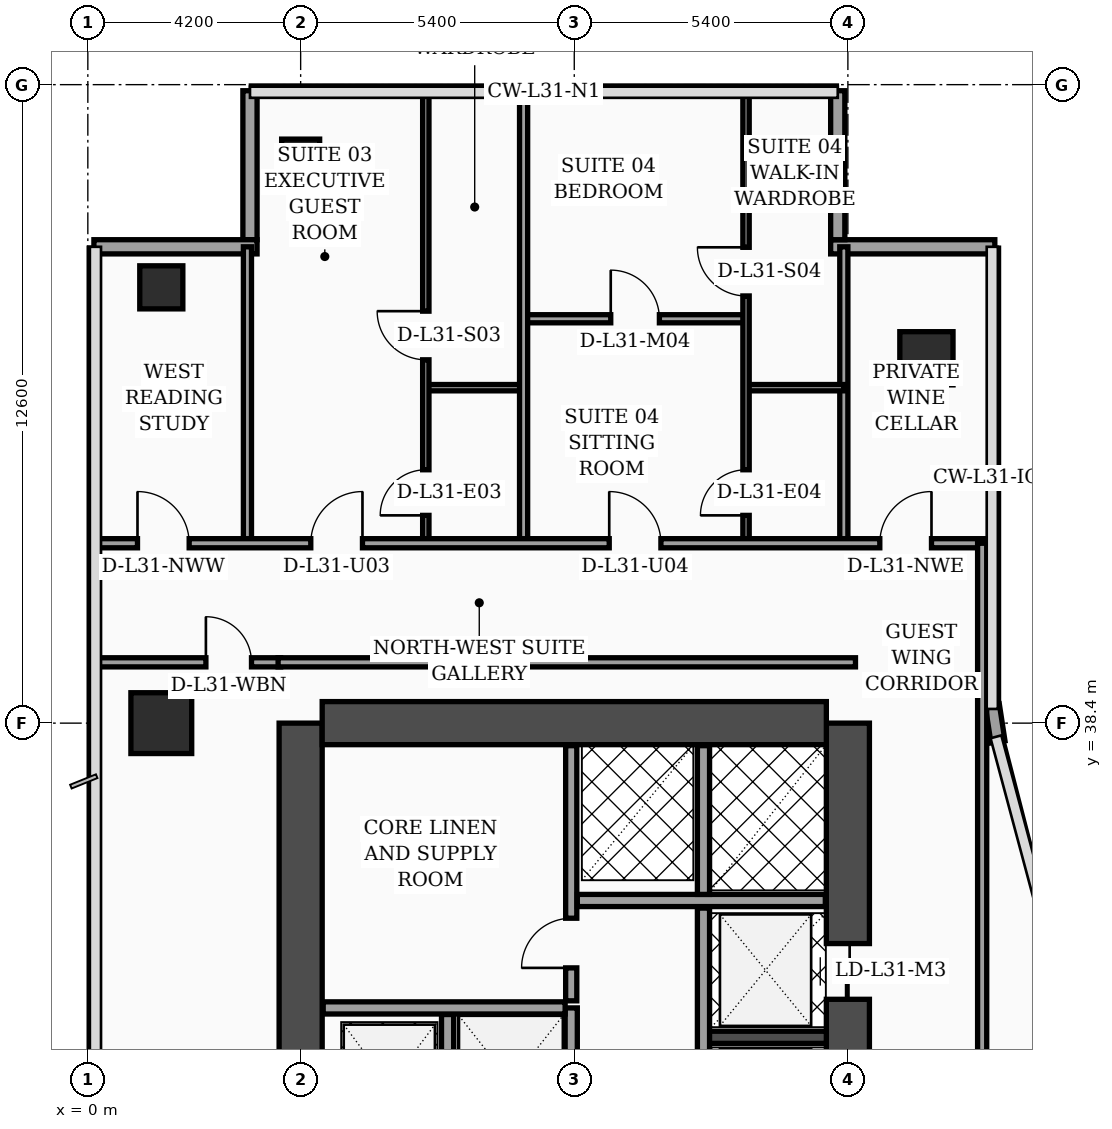
"""IFC4 building model, lengths in metres.
Left out: names, types, materials, properties, quantities, classifications, styles, units other than length and angle.
Written with IfcOpenShell. Run it as: python <this file> out.ifc"""

import sys

from ifc_helpers import new_model, si_unit, direction, frame, frame_2d, origin, origin_2d, place, context, subcontext, project, spatial, rectangle, hollow_rectangle, extrude, element, fill, save


model = new_model("IFC4")
c1 = context("Model", 3, precision=1e-05, world=origin(), true_north=direction((0.0, 1.0)))
c2 = subcontext(c1, "Body", "Model", "MODEL_VIEW")
j1 = project(units=[si_unit("LENGTHUNIT", "METRE"), si_unit("PLANEANGLEUNIT", "RADIAN")], contexts=[c1])
p1 = place(None, origin())
s1 = spatial("IfcSite", under=j1, at=p1, CompositionType="ELEMENT")
p2 = place(p1, origin())
s2 = spatial("IfcBuilding", under=s1, at=p2, CompositionType="ELEMENT")
p3 = place(p2, frame((0.0, 0.0, 127.8)))
s3 = spatial("IfcBuildingStorey", under=s2, at=p3, CompositionType="ELEMENT", Elevation=127.8)
p4 = place(p3, frame((4.2, 16.8, 0.0), z_axis=(0.0, 0.0, 1.0), x_axis=(0.0, 1.0, 0.0)))
e1 = element("IfcWall", 1, at=p4, inside=s3, PredefinedType="SHEAR", context=c2, shape_type="SweptSolid", body=[
    extrude(rectangle(XDim=21.6, YDim=0.85, at=frame_2d((10.8, 0.0))), origin(), (0.0, 0.0, 1.0), 3.56),
])
p5 = place(p3, frame((15.0, 16.8, 0.0), z_axis=(0.0, 0.0, 1.0), x_axis=(0.0, 1.0, 0.0)))
e2 = element("IfcWall", 2, at=p5, inside=s3, PredefinedType="SHEAR", context=c2, shape_type="SweptSolid", body=[
    extrude(rectangle(XDim=21.6, YDim=0.85, at=frame_2d((10.8, 0.0))), origin(), (0.0, 0.0, 1.0), 3.56),
])
p6 = place(p5, frame((8.65, 0.0, 0.0)))
e3 = element("IfcOpeningElement", 3, at=p6, cuts=e2, PredefinedType="OPENING", context=c2, shape_type="SweptSolid", body=[
    extrude(rectangle(XDim=1.1, YDim=2.2, at=frame_2d((0.55, 1.1))), frame((0.0, 0.435, 0.0), z_axis=(0.0, -1.0, 0.0), x_axis=(1.0, 0.0, 0.0)), (0.0, 0.0, 1.0), 0.87),
])
p7 = place(p5, frame((10.85, 0.0, 0.0)))
e4 = element("IfcOpeningElement", 4, at=p7, cuts=e2, PredefinedType="OPENING", context=c2, shape_type="SweptSolid", body=[
    extrude(rectangle(XDim=1.1, YDim=2.2, at=frame_2d((0.55, 1.1))), frame((0.0, 0.435, 0.0), z_axis=(0.0, -1.0, 0.0), x_axis=(1.0, 0.0, 0.0)), (0.0, 0.0, 1.0), 0.87),
])
p8 = place(p5, frame((13.5, 0.0, 0.0)))
e5 = element("IfcOpeningElement", 5, at=p8, cuts=e2, PredefinedType="OPENING", context=c2, shape_type="SweptSolid", body=[
    extrude(rectangle(XDim=1.1, YDim=2.2, at=frame_2d((0.55, 1.1))), frame((0.0, 0.435, 0.0), z_axis=(0.0, -1.0, 0.0), x_axis=(1.0, 0.0, 0.0)), (0.0, 0.0, 1.0), 0.87),
])
p9 = place(p5, frame((16.15, 0.0, 0.0)))
e6 = element("IfcOpeningElement", 6, at=p9, cuts=e2, PredefinedType="OPENING", context=c2, shape_type="SweptSolid", body=[
    extrude(rectangle(XDim=1.1, YDim=2.2, at=frame_2d((0.55, 1.1))), frame((0.0, 0.435, 0.0), z_axis=(0.0, -1.0, 0.0), x_axis=(1.0, 0.0, 0.0)), (0.0, 0.0, 1.0), 0.87),
])
p10 = place(p3, frame((4.625, 38.4, 0.0), z_axis=(0.0, 0.0, 1.0), x_axis=(1.0, 0.0, 0.0)))
e7 = element("IfcWall", 7, at=p10, inside=s3, PredefinedType="SHEAR", context=c2, shape_type="SweptSolid", body=[
    extrude(rectangle(XDim=9.95, YDim=0.85, at=frame_2d((4.975, 0.0))), origin(), (0.0, 0.0, 1.0), 3.56),
])
p11 = place(p3, frame((12.18, 32.2, 0.0), z_axis=(0.0, 0.0, 1.0), x_axis=(1.0, 0.0, 0.0)))
e8 = element("IfcWall", 8, at=p11, inside=s3, PredefinedType="SOLIDWALL", context=c2, shape_type="SweptSolid", body=[
    extrude(rectangle(XDim=2.395, YDim=0.24, at=frame_2d((1.198, 0.0))), origin(), (0.0, 0.0, 1.0), 3.56),
])
p12 = place(p3, frame((1.45, 38.4, 0.0), z_axis=(0.0, 0.0, 1.0), x_axis=(1.0, 0.0, 0.0)))
e9 = element("IfcColumn", 9, at=p12, inside=s3, PredefinedType="COLUMN", context=c2, shape_type="SweptSolid", body=[
    extrude(rectangle(XDim=1.2, YDim=1.2, at=origin_2d()), origin(), (0.0, 0.0, 1.0), 3.56),
])
p13 = place(p3, frame((1.45, 47.0, 0.0), z_axis=(0.0, 0.0, 1.0), x_axis=(1.0, 0.0, 0.0)))
e10 = element("IfcColumn", 10, at=p13, inside=s3, PredefinedType="COLUMN", context=c2, shape_type="SweptSolid", body=[
    extrude(hollow_rectangle(XDim=0.85, YDim=0.85, WallThickness=0.036, at=origin_2d()), origin(), (0.0, 0.0, 1.0), 3.56),
])
p14 = place(p3, frame((4.2, 49.55, 0.0), z_axis=(0.0, 0.0, 1.0), x_axis=(1.0, 0.0, 0.0)))
e11 = element("IfcColumn", 11, at=p14, inside=s3, PredefinedType="COLUMN", context=c2, shape_type="SweptSolid", body=[
    extrude(hollow_rectangle(XDim=0.75, YDim=0.75, WallThickness=0.032, at=origin_2d()), origin(), (0.0, 0.0, 1.0), 3.56),
])
p15 = place(p3, frame((16.55, 45.6, 0.0), z_axis=(0.0, 0.0, 1.0), x_axis=(1.0, 0.0, 0.0)))
e12 = element("IfcColumn", 12, at=p15, inside=s3, PredefinedType="COLUMN", context=c2, shape_type="SweptSolid", body=[
    extrude(rectangle(XDim=1.05, YDim=1.05, at=origin_2d()), origin(), (0.0, 0.0, 1.0), 3.56),
])
p16 = place(p3, frame((17.962, 38.03, 0.0), z_axis=(0.0, 0.0, 1.0), x_axis=(-0.15141125477, 0.988470855377, 0.0)))
e13 = element("IfcWall", 13, at=p16, inside=s3, PredefinedType="SOLIDWALL", context=c2, shape_type="SweptSolid", body=[
    extrude(rectangle(XDim=0.739, YDim=0.28, at=frame_2d((0.369, 0.0))), origin(), (0.0, 0.0, 1.0), 3.56),
])
p17 = place(p3, frame((17.9, 47.8, 0.0), z_axis=(0.0, 0.0, 1.0), x_axis=(-1.0, 0.0, 0.0)))
e14 = element("IfcWall", 14, at=p17, inside=s3, PredefinedType="SOLIDWALL", context=c2, shape_type="SweptSolid", body=[
    extrude(rectangle(XDim=3.24, YDim=0.28, at=frame_2d((1.62, 0.0))), origin(), (0.0, 0.0, 1.0), 3.56),
])
p18 = place(p3, frame((14.8, 47.94, 0.0), z_axis=(0.0, 0.0, 1.0), x_axis=(0.0, 1.0, 0.0)))
e15 = element("IfcWall", 15, at=p18, inside=s3, PredefinedType="SOLIDWALL", context=c2, shape_type="SweptSolid", body=[
    extrude(rectangle(XDim=2.94, YDim=0.28, at=frame_2d((1.47, 0.0))), origin(), (0.0, 0.0, 1.0), 3.56),
])
p19 = place(p3, frame((3.2, 50.88, 0.0), z_axis=(0.0, 0.0, 1.0), x_axis=(0.0, -1.0, 0.0)))
e16 = element("IfcWall", 16, at=p19, inside=s3, PredefinedType="SOLIDWALL", context=c2, shape_type="SweptSolid", body=[
    extrude(rectangle(XDim=2.94, YDim=0.28, at=frame_2d((1.47, 0.0))), origin(), (0.0, 0.0, 1.0), 3.04),
])
p20 = place(p3, frame((3.34, 47.8, 0.0), z_axis=(0.0, 0.0, 1.0), x_axis=(-1.0, 0.0, 0.0)))
e17 = element("IfcWall", 17, at=p20, inside=s3, PredefinedType="SOLIDWALL", context=c2, shape_type="SweptSolid", body=[
    extrude(rectangle(XDim=3.22, YDim=0.28, at=frame_2d((1.61, 0.0))), origin(), (0.0, 0.0, 1.0), 3.04),
])
p21 = place(p3, frame((7.1, 30.02, 0.0), z_axis=(0.0, 0.0, 1.0), x_axis=(0.0, 1.0, 0.0)))
e18 = element("IfcWall", 18, at=p21, inside=s3, PredefinedType="SOLIDWALL", context=c2, shape_type="SweptSolid", body=[
    extrude(rectangle(XDim=2.63, YDim=0.24, at=frame_2d((1.315, 0.0))), origin(), (0.0, 0.0, 1.0), 3.56),
])
p22 = place(p3, frame((9.54, 29.88, 0.0), z_axis=(0.0, 0.0, 1.0), x_axis=(0.0, 1.0, 0.0)))
e19 = element("IfcWall", 19, at=p22, inside=s3, PredefinedType="SOLIDWALL", context=c2, shape_type="SweptSolid", body=[
    extrude(rectangle(XDim=2.9, YDim=0.24, at=frame_2d((1.45, 0.0))), origin(), (0.0, 0.0, 1.0), 3.56),
])
p23 = place(p22, frame((0.7, 0.0, 0.0)))
e20 = element("IfcOpeningElement", 20, at=p23, cuts=e19, PredefinedType="OPENING", context=c2, shape_type="SweptSolid", body=[
    extrude(rectangle(XDim=1.3, YDim=2.35, at=frame_2d((0.65, 1.175))), frame((0.0, 0.13, 0.0), z_axis=(0.0, -1.0, 0.0), x_axis=(1.0, 0.0, 0.0)), (0.0, 0.0, 1.0), 0.26),
])
p24 = place(p3, frame((4.645, 32.78, 0.0), z_axis=(0.0, 0.0, 1.0), x_axis=(1.0, 0.0, 0.0)))
e21 = element("IfcWall", 21, at=p24, inside=s3, PredefinedType="SOLIDWALL", context=c2, shape_type="SweptSolid", body=[
    extrude(rectangle(XDim=4.775, YDim=0.24, at=frame_2d((2.387, 0.0))), origin(), (0.0, 0.0, 1.0), 3.19),
])
p25 = place(p3, frame((9.54, 32.92, 0.0), z_axis=(0.0, 0.0, 1.0), x_axis=(0.0, 1.0, 0.0)))
e22 = element("IfcWall", 22, at=p25, inside=s3, PredefinedType="SOLIDWALL", context=c2, shape_type="SweptSolid", body=[
    extrude(rectangle(XDim=5.035, YDim=0.22, at=frame_2d((2.518, 0.0))), origin(), (0.0, 0.0, 1.0), 3.56),
])
p26 = place(p25, frame((0.65, 0.0, 0.0)))
e23 = element("IfcOpeningElement", 23, at=p26, cuts=e22, PredefinedType="OPENING", context=c2, shape_type="SweptSolid", body=[
    extrude(rectangle(XDim=0.98, YDim=2.15, at=frame_2d((0.49, 1.075))), frame((0.0, 0.12, 0.0), z_axis=(0.0, -1.0, 0.0), x_axis=(1.0, 0.0, 0.0)), (0.0, 0.0, 1.0), 0.24),
])
p27 = place(p3, frame((12.15, 27.0, 0.0), z_axis=(0.0, 0.0, 1.0), x_axis=(0.0, 1.0, 0.0)))
e24 = element("IfcWall", 24, at=p27, inside=s3, PredefinedType="SOLIDWALL", context=c2, shape_type="SweptSolid", body=[
    extrude(rectangle(XDim=7.75, YDim=0.24, at=frame_2d((3.875, 0.0))), origin(), (0.0, 0.0, 1.0), 3.56),
])
p28 = place(p3, frame((9.66, 34.9, 0.0), z_axis=(0.0, 0.0, 1.0), x_axis=(1.0, 0.0, 0.0)))
e25 = element("IfcWall", 25, at=p28, inside=s3, PredefinedType="SOLIDWALL", context=c2, shape_type="SweptSolid", body=[
    extrude(rectangle(XDim=4.895, YDim=0.24, at=frame_2d((2.448, 0.0))), origin(), (0.0, 0.0, 1.0), 3.56),
])
p29 = place(p3, frame((12.15, 35.02, 0.0), z_axis=(0.0, 0.0, 1.0), x_axis=(0.0, 1.0, 0.0)))
e26 = element("IfcWall", 26, at=p29, inside=s3, PredefinedType="SOLIDWALL", context=c2, shape_type="SweptSolid", body=[
    extrude(rectangle(XDim=2.935, YDim=0.24, at=frame_2d((1.468, 0.0))), origin(), (0.0, 0.0, 1.0), 3.56),
])
p30 = place(p3, frame((0.08, 39.6, 0.0), z_axis=(0.0, 0.0, 1.0), x_axis=(1.0, 0.0, 0.0)))
e27 = element("IfcWall", 27, at=p30, inside=s3, PredefinedType="PARTITIONING", context=c2, shape_type="SweptSolid", body=[
    extrude(rectangle(XDim=3.725, YDim=0.18, at=frame_2d((1.862, 0.0))), origin(), (0.0, 0.0, 1.0), 2.84),
])
p31 = place(p30, frame((2.25, 0.0, 0.0)))
e28 = element("IfcOpeningElement", 28, at=p31, cuts=e27, PredefinedType="OPENING", context=c2, shape_type="SweptSolid", body=[
    extrude(rectangle(XDim=0.9, YDim=2.15, at=frame_2d((0.45, 1.075))), frame((0.0, 0.1, 0.0), z_axis=(0.0, -1.0, 0.0), x_axis=(1.0, 0.0, 0.0)), (0.0, 0.0, 1.0), 0.2),
])
p32 = place(p3, frame((3.15, 41.95, 0.0), z_axis=(0.0, 0.0, 1.0), x_axis=(0.0, 1.0, 0.0)))
e29 = element("IfcWall", 29, at=p32, inside=s3, PredefinedType="PARTITIONING", context=c2, shape_type="SweptSolid", body=[
    extrude(rectangle(XDim=5.85, YDim=0.16, at=frame_2d((2.925, 0.0))), origin(), (0.0, 0.0, 1.0), 3.14),
])
p33 = place(p3, frame((14.92, 41.95, 0.0), z_axis=(0.0, 0.0, 1.0), x_axis=(0.0, 1.0, 0.0)))
e30 = element("IfcWall", 30, at=p33, inside=s3, PredefinedType="PARTITIONING", context=c2, shape_type="SweptSolid", body=[
    extrude(rectangle(XDim=5.85, YDim=0.16, at=frame_2d((2.925, 0.0))), origin(), (0.0, 0.0, 1.0), 3.04),
])
p34 = place(p3, frame((6.67, 45.02, 0.0), z_axis=(0.0, 0.0, 1.0), x_axis=(1.0, 0.0, 0.0)))
e31 = element("IfcWall", 31, at=p34, inside=s3, PredefinedType="PARTITIONING", context=c2, shape_type="SweptSolid", body=[
    extrude(rectangle(XDim=1.93, YDim=0.125, at=frame_2d((0.965, 0.0))), origin(), (0.0, 0.0, 1.0), 3.56),
])
p35 = place(p3, frame((6.67, 41.95, 0.0), z_axis=(0.0, 0.0, 1.0), x_axis=(0.0, 1.0, 0.0)))
e32 = element("IfcWall", 32, at=p35, inside=s3, PredefinedType="PARTITIONING", context=c2, shape_type="SweptSolid", body=[
    extrude(rectangle(XDim=8.99, YDim=0.125, at=frame_2d((4.495, 0.0))), origin(), (0.0, 0.0, 1.0), 3.04),
])
p36 = place(p35, frame((0.55, 0.0, 0.0)))
e33 = element("IfcOpeningElement", 33, at=p36, cuts=e32, PredefinedType="OPENING", context=c2, shape_type="SweptSolid", body=[
    extrude(rectangle(XDim=0.9, YDim=2.15, at=frame_2d((0.45, 1.075))), frame((0.0, 0.073, 0.0), z_axis=(0.0, -1.0, 0.0), x_axis=(1.0, 0.0, 0.0)), (0.0, 0.0, 1.0), 0.145),
])
p37 = place(p35, frame((3.62, 0.0, 0.0)))
e34 = element("IfcOpeningElement", 34, at=p37, cuts=e32, PredefinedType="OPENING", context=c2, shape_type="SweptSolid", body=[
    extrude(rectangle(XDim=0.96, YDim=2.2, at=frame_2d((0.48, 1.1))), frame((0.0, 0.073, 0.0), z_axis=(0.0, -1.0, 0.0), x_axis=(1.0, 0.0, 0.0)), (0.0, 0.0, 1.0), 0.145),
])
p38 = place(p3, frame((12.99, 45.02, 0.0), z_axis=(0.0, 0.0, 1.0), x_axis=(1.0, 0.0, 0.0)))
e35 = element("IfcWall", 35, at=p38, inside=s3, PredefinedType="PARTITIONING", context=c2, shape_type="SweptSolid", body=[
    extrude(rectangle(XDim=1.93, YDim=0.125, at=frame_2d((0.965, 0.0))), origin(), (0.0, 0.0, 1.0), 3.56),
])
p39 = place(p3, frame((8.6, 46.38, 0.0), z_axis=(0.0, 0.0, 1.0), x_axis=(1.0, 0.0, 0.0)))
e36 = element("IfcWall", 36, at=p39, inside=s3, PredefinedType="PARTITIONING", context=c2, shape_type="SweptSolid", body=[
    extrude(rectangle(XDim=4.39, YDim=0.16, at=frame_2d((2.195, 0.0))), origin(), (0.0, 0.0, 1.0), 3.04),
])
p40 = place(p39, frame((1.72, 0.0, 0.0)))
e37 = element("IfcOpeningElement", 37, at=p40, cuts=e36, PredefinedType="OPENING", context=c2, shape_type="SweptSolid", body=[
    extrude(rectangle(XDim=0.96, YDim=2.2, at=frame_2d((0.48, 1.1))), frame((0.0, 0.09, 0.0), z_axis=(0.0, -1.0, 0.0), x_axis=(1.0, 0.0, 0.0)), (0.0, 0.0, 1.0), 0.18),
])
p41 = place(p3, frame((12.99, 41.95, 0.0), z_axis=(0.0, 0.0, 1.0), x_axis=(0.0, 1.0, 0.0)))
e38 = element("IfcWall", 38, at=p41, inside=s3, PredefinedType="PARTITIONING", context=c2, shape_type="SweptSolid", body=[
    extrude(rectangle(XDim=8.99, YDim=0.125, at=frame_2d((4.495, 0.0))), origin(), (0.0, 0.0, 1.0), 3.04),
])
p42 = place(p41, frame((0.55, 0.0, 0.0)))
e39 = element("IfcOpeningElement", 39, at=p42, cuts=e38, PredefinedType="OPENING", context=c2, shape_type="SweptSolid", body=[
    extrude(rectangle(XDim=0.9, YDim=2.15, at=frame_2d((0.45, 1.075))), frame((0.0, 0.073, 0.0), z_axis=(0.0, -1.0, 0.0), x_axis=(1.0, 0.0, 0.0)), (0.0, 0.0, 1.0), 0.145),
])
p43 = place(p41, frame((4.88, 0.0, 0.0)))
e40 = element("IfcOpeningElement", 40, at=p43, cuts=e38, PredefinedType="OPENING", context=c2, shape_type="SweptSolid", body=[
    extrude(rectangle(XDim=0.96, YDim=2.2, at=frame_2d((0.48, 1.1))), frame((0.0, 0.073, 0.0), z_axis=(0.0, -1.0, 0.0), x_axis=(1.0, 0.0, 0.0)), (0.0, 0.0, 1.0), 0.145),
])
p44 = place(p3, frame((8.6, 41.95, 0.0), z_axis=(0.0, 0.0, 1.0), x_axis=(0.0, 1.0, 0.0)))
e41 = element("IfcWall", 41, at=p44, inside=s3, PredefinedType="PARTITIONING", context=c2, shape_type="SweptSolid", body=[
    extrude(rectangle(XDim=8.99, YDim=0.16, at=frame_2d((4.495, 0.0))), origin(), (0.0, 0.0, 1.0), 3.04),
])
p45 = place(p3, frame((0.08, 41.95, 0.0), z_axis=(0.0, 0.0, 1.0), x_axis=(1.0, 0.0, 0.0)))
e42 = element("IfcWall", 42, at=p45, inside=s3, PredefinedType="PARTITIONING", context=c2, shape_type="SweptSolid", body=[
    extrude(rectangle(XDim=17.77, YDim=0.18, at=frame_2d((8.885, 0.0))), origin(), (0.0, 0.0, 1.0), 2.84),
])
p46 = place(p45, frame((0.9, 0.0, 0.0)))
e43 = element("IfcOpeningElement", 43, at=p46, cuts=e42, PredefinedType="OPENING", context=c2, shape_type="SweptSolid", body=[
    extrude(rectangle(XDim=1.02, YDim=2.2, at=frame_2d((0.51, 1.1))), frame((0.0, 0.1, 0.0), z_axis=(0.0, -1.0, 0.0), x_axis=(1.0, 0.0, 0.0)), (0.0, 0.0, 1.0), 0.2),
])
p47 = place(p45, frame((4.32, 0.0, 0.0)))
e44 = element("IfcOpeningElement", 44, at=p47, cuts=e42, PredefinedType="OPENING", context=c2, shape_type="SweptSolid", body=[
    extrude(rectangle(XDim=1.02, YDim=2.2, at=frame_2d((0.51, 1.1))), frame((0.0, 0.1, 0.0), z_axis=(0.0, -1.0, 0.0), x_axis=(1.0, 0.0, 0.0)), (0.0, 0.0, 1.0), 0.2),
])
p48 = place(p45, frame((10.21, 0.0, 0.0)))
e45 = element("IfcOpeningElement", 45, at=p48, cuts=e42, PredefinedType="OPENING", context=c2, shape_type="SweptSolid", body=[
    extrude(rectangle(XDim=1.02, YDim=2.2, at=frame_2d((0.51, 1.1))), frame((0.0, 0.1, 0.0), z_axis=(0.0, -1.0, 0.0), x_axis=(1.0, 0.0, 0.0)), (0.0, 0.0, 1.0), 0.2),
])
p49 = place(p45, frame((15.55, 0.0, 0.0)))
e46 = element("IfcOpeningElement", 46, at=p49, cuts=e42, PredefinedType="OPENING", context=c2, shape_type="SweptSolid", body=[
    extrude(rectangle(XDim=1.02, YDim=2.2, at=frame_2d((0.51, 1.1))), frame((0.0, 0.1, 0.0), z_axis=(0.0, -1.0, 0.0), x_axis=(1.0, 0.0, 0.0)), (0.0, 0.0, 1.0), 0.2),
])
p50 = place(p3, frame((17.65, 24.3, 0.0), z_axis=(0.0, 0.0, 1.0), x_axis=(0.0, 1.0, 0.0)))
e47 = element("IfcWall", 47, at=p50, inside=s3, PredefinedType="PARTITIONING", context=c2, shape_type="SweptSolid", body=[
    extrude(rectangle(XDim=17.65, YDim=0.18, at=frame_2d((8.825, 0.0))), origin(), (0.0, 0.0, 1.0), 2.84),
])
p51 = place(p3, frame((3.755, 39.6, 0.0), z_axis=(0.0, 0.0, 1.0), x_axis=(1.0, 0.0, 0.0)))
e48 = element("IfcWall", 48, at=p51, inside=s3, PredefinedType="PARTITIONING", context=c2, shape_type="SweptSolid", body=[
    extrude(rectangle(XDim=11.395, YDim=0.18, at=frame_2d((5.698, 0.0))), origin(), (0.0, 0.0, 1.0), 2.84),
])
p52 = place(p26, origin())
e49 = element("IfcDoor", 49, at=p52, inside=s3, OperationType="SINGLE_SWING_LEFT", PredefinedType="DOOR", context=c2, shape_type="SweptSolid", body=[
    extrude(rectangle(XDim=0.98, YDim=2.15, at=frame_2d((0.49, 1.075))), frame((0.0, 0.025, 0.0), z_axis=(0.0, -1.0, 0.0), x_axis=(1.0, 0.0, 0.0)), (0.0, 0.0, 1.0), 0.05),
])
fill(e23, e49)
p53 = place(p31, origin())
e50 = element("IfcDoor", 50, at=p53, inside=s3, OperationType="SINGLE_SWING_LEFT", PredefinedType="DOOR", context=c2, shape_type="SweptSolid", body=[
    extrude(rectangle(XDim=0.9, YDim=2.15, at=frame_2d((0.45, 1.075))), frame((0.0, 0.025, 0.0), z_axis=(0.0, -1.0, 0.0), x_axis=(1.0, 0.0, 0.0)), (0.0, 0.0, 1.0), 0.05),
])
fill(e28, e50)
p54 = place(p36, origin())
e51 = element("IfcDoor", 51, at=p54, inside=s3, OperationType="SINGLE_SWING_LEFT", PredefinedType="DOOR", context=c2, shape_type="SweptSolid", body=[
    extrude(rectangle(XDim=0.9, YDim=2.15, at=frame_2d((0.45, 1.075))), frame((0.0, 0.025, 0.0), z_axis=(0.0, -1.0, 0.0), x_axis=(1.0, 0.0, 0.0)), (0.0, 0.0, 1.0), 0.05),
])
fill(e33, e51)
p55 = place(p37, origin())
e52 = element("IfcDoor", 52, at=p55, inside=s3, OperationType="SINGLE_SWING_RIGHT", PredefinedType="DOOR", context=c2, shape_type="SweptSolid", body=[
    extrude(rectangle(XDim=0.96, YDim=2.2, at=frame_2d((0.48, 1.1))), frame((0.0, 0.025, 0.0), z_axis=(0.0, -1.0, 0.0), x_axis=(1.0, 0.0, 0.0)), (0.0, 0.0, 1.0), 0.05),
])
fill(e34, e52)
p56 = place(p40, origin())
e53 = element("IfcDoor", 53, at=p56, inside=s3, OperationType="SINGLE_SWING_LEFT", PredefinedType="DOOR", context=c2, shape_type="SweptSolid", body=[
    extrude(rectangle(XDim=0.96, YDim=2.2, at=frame_2d((0.48, 1.1))), frame((0.0, 0.025, 0.0), z_axis=(0.0, -1.0, 0.0), x_axis=(1.0, 0.0, 0.0)), (0.0, 0.0, 1.0), 0.05),
])
fill(e37, e53)
p57 = place(p42, origin())
e54 = element("IfcDoor", 54, at=p57, inside=s3, OperationType="SINGLE_SWING_LEFT", PredefinedType="DOOR", context=c2, shape_type="SweptSolid", body=[
    extrude(rectangle(XDim=0.9, YDim=2.15, at=frame_2d((0.45, 1.075))), frame((0.0, 0.025, 0.0), z_axis=(0.0, -1.0, 0.0), x_axis=(1.0, 0.0, 0.0)), (0.0, 0.0, 1.0), 0.05),
])
fill(e39, e54)
p58 = place(p43, origin())
e55 = element("IfcDoor", 55, at=p58, inside=s3, OperationType="SINGLE_SWING_RIGHT", PredefinedType="DOOR", context=c2, shape_type="SweptSolid", body=[
    extrude(rectangle(XDim=0.96, YDim=2.2, at=frame_2d((0.48, 1.1))), frame((0.0, 0.025, 0.0), z_axis=(0.0, -1.0, 0.0), x_axis=(1.0, 0.0, 0.0)), (0.0, 0.0, 1.0), 0.05),
])
fill(e40, e55)
p59 = place(p46, origin())
e56 = element("IfcDoor", 56, at=p59, inside=s3, OperationType="SINGLE_SWING_LEFT", PredefinedType="DOOR", context=c2, shape_type="SweptSolid", body=[
    extrude(rectangle(XDim=1.02, YDim=2.2, at=frame_2d((0.51, 1.1))), frame((0.0, 0.025, 0.0), z_axis=(0.0, -1.0, 0.0), x_axis=(1.0, 0.0, 0.0)), (0.0, 0.0, 1.0), 0.05),
])
fill(e43, e56)
p60 = place(p47, origin())
e57 = element("IfcDoor", 57, at=p60, inside=s3, OperationType="SINGLE_SWING_RIGHT", PredefinedType="DOOR", context=c2, shape_type="SweptSolid", body=[
    extrude(rectangle(XDim=1.02, YDim=2.2, at=frame_2d((0.51, 1.1))), frame((0.0, 0.025, 0.0), z_axis=(0.0, -1.0, 0.0), x_axis=(1.0, 0.0, 0.0)), (0.0, 0.0, 1.0), 0.05),
])
fill(e44, e57)
p61 = place(p48, origin())
e58 = element("IfcDoor", 58, at=p61, inside=s3, OperationType="SINGLE_SWING_LEFT", PredefinedType="DOOR", context=c2, shape_type="SweptSolid", body=[
    extrude(rectangle(XDim=1.02, YDim=2.2, at=frame_2d((0.51, 1.1))), frame((0.0, 0.025, 0.0), z_axis=(0.0, -1.0, 0.0), x_axis=(1.0, 0.0, 0.0)), (0.0, 0.0, 1.0), 0.05),
])
fill(e45, e58)
p62 = place(p49, origin())
e59 = element("IfcDoor", 59, at=p62, inside=s3, OperationType="SINGLE_SWING_RIGHT", PredefinedType="DOOR", context=c2, shape_type="SweptSolid", body=[
    extrude(rectangle(XDim=1.02, YDim=2.2, at=frame_2d((0.51, 1.1))), frame((0.0, 0.025, 0.0), z_axis=(0.0, -1.0, 0.0), x_axis=(1.0, 0.0, 0.0)), (0.0, 0.0, 1.0), 0.05),
])
fill(e46, e59)
p63 = place(p9, origin())
e60 = element("IfcDoor", 60, at=p63, inside=s3, OperationType="DOUBLE_DOOR_SLIDING", PredefinedType="DOOR", context=c2, shape_type="SweptSolid", body=[
    extrude(rectangle(XDim=1.1, YDim=2.2, at=frame_2d((0.55, 1.1))), frame((0.0, 0.025, 0.0), z_axis=(0.0, -1.0, 0.0), x_axis=(1.0, 0.0, 0.0)), (0.0, 0.0, 1.0), 0.05),
])
fill(e6, e60)
save(model, sys.argv[1])
